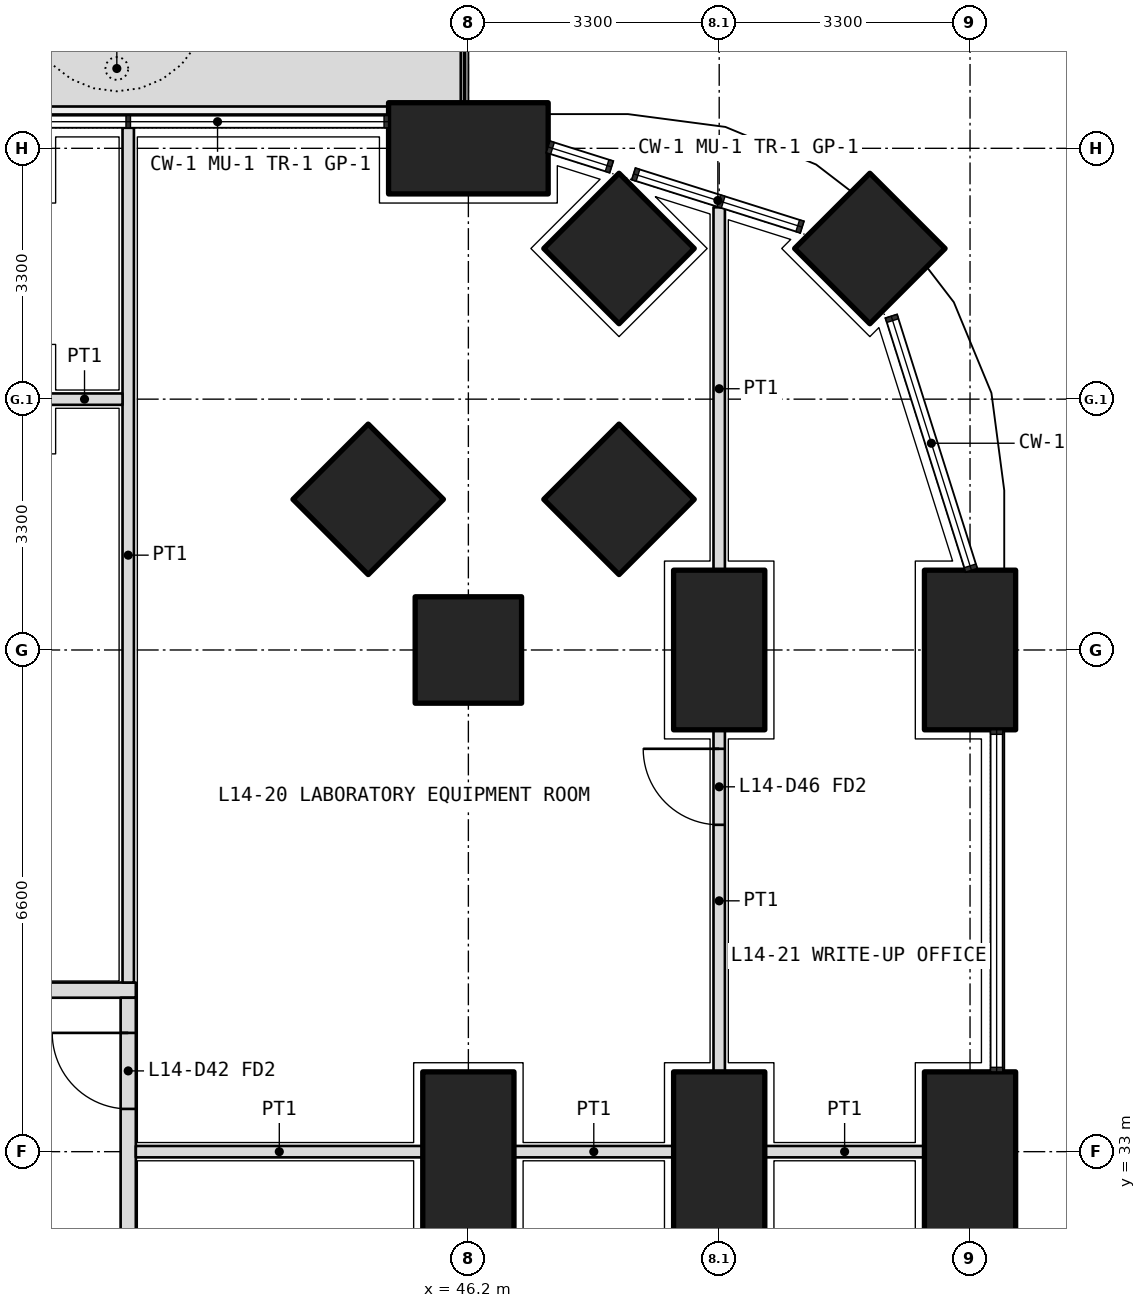
"""IFC4 building model, lengths in metres.
Left out: names, types, materials, properties, quantities, classifications, styles, units other than length and angle.
Written with IfcOpenShell. Run it as: python <this file> out.ifc"""

import sys

from ifc_helpers import new_model, si_unit, direction, frame, frame_2d, origin, origin_2d, place, context, subcontext, project, spatial, polyline, rectangle, outline, extrude, element, fill, save


model = new_model("IFC4")
c1 = context("Model", 3, precision=1e-05, world=origin(), true_north=direction((0.0, 1.0)))
c2 = subcontext(c1, "Body", "Model", "MODEL_VIEW")
j1 = project(units=[si_unit("LENGTHUNIT", "METRE"), si_unit("PLANEANGLEUNIT", "RADIAN")], contexts=[c1])
p1 = place(None, origin())
s1 = spatial("IfcSite", under=j1, at=p1, CompositionType="ELEMENT")
p2 = place(p1, origin())
s2 = spatial("IfcBuilding", under=s1, at=p2, CompositionType="ELEMENT")
p3 = place(p2, frame((0.0, 0.0, 63.3)))
s3 = spatial("IfcBuildingStorey", under=s2, at=p3, CompositionType="ELEMENT", Elevation=63.3)
p4 = place(p3, frame((51.482, 44.882, 0.0), z_axis=(0.0, 0.0, 1.0), x_axis=(0.707106781187, 0.707106781187, 0.0)))
e1 = element("IfcColumn", 1, at=p4, inside=s3, PredefinedType="COLUMN", context=c2, shape_type="SweptSolid", body=[
    extrude(rectangle(XDim=1.4, YDim=1.4, at=origin_2d()), origin(), (0.0, 0.0, 1.0), 4.2),
])
for number, where, z_axis, x_axis in (
    (2, (52.8, 33.0, 0.0), (0.0, 0.0, 1.0), (0.0, 1.0, 0.0)),
    (3, (52.8, 39.6, 0.0), (0.0, 0.0, 1.0), (0.0, 1.0, 0.0)),
    (4, (46.2, 46.2, 0.0), (0.0, 0.0, 1.0), (1.0, 0.0, 0.0)),
):
    element("IfcColumn", number, at=place(p3, frame(where, z_axis=z_axis, x_axis=x_axis)), inside=s3, PredefinedType="COLUMN", context=c2, shape_type="SweptSolid", body=[
        extrude(rectangle(XDim=2.1, YDim=1.2, at=origin_2d()), origin(), (0.0, 0.0, 1.0), 4.2),
    ])
for number, where, z_axis, x_axis in (
    (5, (46.2, 39.6, 0.0), (0.0, 0.0, 1.0), (1.0, 0.0, 0.0)),
    (6, (48.182, 44.882, 0.0), (0.0, 0.0, 1.0), (0.707, 0.707, 0.0)),
):
    element("IfcColumn", number, at=place(p3, frame(where, z_axis=z_axis, x_axis=x_axis)), inside=s3, PredefinedType="COLUMN", context=c2, shape_type="SweptSolid", body=[
        extrude(rectangle(XDim=1.4, YDim=1.4, at=origin_2d()), origin(), (0.0, 0.0, 1.0), 4.2),
    ])
for number, where, z_axis, x_axis in (
    (7, (49.5, 33.0, 0.0), (0.0, 0.0, 1.0), (0.0, 1.0, 0.0)),
    (8, (49.5, 39.6, 0.0), (0.0, 0.0, 1.0), (0.0, 1.0, 0.0)),
):
    element("IfcColumn", number, at=place(p3, frame(where, z_axis=z_axis, x_axis=x_axis)), inside=s3, PredefinedType="COLUMN", context=c2, shape_type="SweptSolid", body=[
        extrude(rectangle(XDim=2.1, YDim=1.2, at=origin_2d()), origin(), (0.0, 0.0, 1.0), 4.2),
    ])
for number, where, z_axis, x_axis in (
    (9, (48.182, 41.582, 0.0), (0.0, 0.0, 1.0), (0.707, 0.707, 0.0)),
    (10, (44.882, 41.582, 0.0), (0.0, 0.0, 1.0), (0.707, 0.707, 0.0)),
):
    element("IfcColumn", number, at=place(p3, frame(where, z_axis=z_axis, x_axis=x_axis)), inside=s3, PredefinedType="COLUMN", context=c2, shape_type="SweptSolid", body=[
        extrude(rectangle(XDim=1.4, YDim=1.4, at=origin_2d()), origin(), (0.0, 0.0, 1.0), 4.2),
    ])
p5 = place(p3, frame((46.2, 33.0, 0.0), z_axis=(0.0, 0.0, 1.0), x_axis=(0.0, 1.0, 0.0)))
e11 = element("IfcColumn", 11, at=p5, inside=s3, PredefinedType="COLUMN", context=c2, shape_type="SweptSolid", body=[
    extrude(rectangle(XDim=2.1, YDim=1.2, at=origin_2d()), origin(), (0.0, 0.0, 1.0), 4.2),
])
p6 = place(p3, origin())
e12 = element("IfcWall", 12, at=p6, inside=s3, PredefinedType="USERDEFINED", context=c2, shape_type="SweptSolid", body=[
    extrude(outline(polyline([(37.05, 46.75), (46.1, 46.75), (46.1, 47.75), (37.05, 47.75), (37.05, 46.75)]), holes=[polyline([(37.2, 46.9), (45.95, 46.9), (45.95, 47.6), (37.2, 47.6), (37.2, 46.9)])]), origin(), (0.0, 0.0, 1.0), 1.05),
])
p7 = place(p3, frame((10.975, 35.125, 0.0), z_axis=(0.0, 0.0, 1.0), x_axis=(1.0, 0.0, 0.0)))
e13 = element("IfcWall", 13, at=p7, inside=s3, PredefinedType="PARTITIONING", context=c2, shape_type="SweptSolid", body=[
    extrude(rectangle(XDim=30.85, YDim=0.2, at=frame_2d((15.425, 0.0))), origin(), (0.0, 0.0, 1.0), 2.85),
])
p8 = place(p7, frame((2.312, 0.0, 0.0)))
e14 = element("IfcOpeningElement", 14, at=p8, cuts=e13, PredefinedType="OPENING", context=c2, shape_type="SweptSolid", body=[
    extrude(rectangle(XDim=1.0, YDim=2.1, at=frame_2d((0.5, 1.05))), frame((0.0, 0.11, 0.0), z_axis=(0.0, -1.0, 0.0), x_axis=(1.0, 0.0, 0.0)), (0.0, 0.0, 1.0), 0.22),
])
p9 = place(p7, frame((13.175, 0.0, 0.0)))
e15 = element("IfcOpeningElement", 15, at=p9, cuts=e13, PredefinedType="OPENING", context=c2, shape_type="SweptSolid", body=[
    extrude(rectangle(XDim=1.2, YDim=2.1, at=frame_2d((0.6, 1.05))), frame((0.0, 0.11, 0.0), z_axis=(0.0, -1.0, 0.0), x_axis=(1.0, 0.0, 0.0)), (0.0, 0.0, 1.0), 0.22),
])
p10 = place(p7, frame((25.788, 0.0, 0.0)))
e16 = element("IfcOpeningElement", 16, at=p10, cuts=e13, PredefinedType="OPENING", context=c2, shape_type="SweptSolid", body=[
    extrude(rectangle(XDim=1.2, YDim=2.1, at=frame_2d((0.6, 1.05))), frame((0.0, 0.11, 0.0), z_axis=(0.0, -1.0, 0.0), x_axis=(1.0, 0.0, 0.0)), (0.0, 0.0, 1.0), 0.22),
])
p11 = place(p3, frame((41.725, 19.8, 0.0), z_axis=(0.0, 0.0, 1.0), x_axis=(0.0, 1.0, 0.0)))
e17 = element("IfcWall", 17, at=p11, inside=s3, PredefinedType="PARTITIONING", context=c2, shape_type="SweptSolid", body=[
    extrude(rectangle(XDim=15.225, YDim=0.2, at=frame_2d((7.612, 0.0))), origin(), (0.0, 0.0, 1.0), 2.85),
])
p12 = place(p11, frame((1.0, 0.0, 0.0)))
e18 = element("IfcOpeningElement", 18, at=p12, cuts=e17, PredefinedType="OPENING", context=c2, shape_type="SweptSolid", body=[
    extrude(rectangle(XDim=1.0, YDim=2.1, at=frame_2d((0.5, 1.05))), frame((0.0, 0.11, 0.0), z_axis=(0.0, -1.0, 0.0), x_axis=(1.0, 0.0, 0.0)), (0.0, 0.0, 1.0), 0.22),
])
p13 = place(p11, frame((4.35, 0.0, 0.0)))
e19 = element("IfcOpeningElement", 19, at=p13, cuts=e17, PredefinedType="OPENING", context=c2, shape_type="SweptSolid", body=[
    extrude(rectangle(XDim=0.9, YDim=2.1, at=frame_2d((0.45, 1.05))), frame((0.0, 0.11, 0.0), z_axis=(0.0, -1.0, 0.0), x_axis=(1.0, 0.0, 0.0)), (0.0, 0.0, 1.0), 0.22),
])
p14 = place(p11, frame((9.3, 0.0, 0.0)))
e20 = element("IfcOpeningElement", 20, at=p14, cuts=e17, PredefinedType="OPENING", context=c2, shape_type="SweptSolid", body=[
    extrude(rectangle(XDim=1.2, YDim=2.1, at=frame_2d((0.6, 1.05))), frame((0.0, 0.11, 0.0), z_axis=(0.0, -1.0, 0.0), x_axis=(1.0, 0.0, 0.0)), (0.0, 0.0, 1.0), 0.22),
])
p15 = place(p11, frame((13.762, 0.0, 0.0)))
e21 = element("IfcOpeningElement", 21, at=p15, cuts=e17, PredefinedType="OPENING", context=c2, shape_type="SweptSolid", body=[
    extrude(rectangle(XDim=1.0, YDim=2.1, at=frame_2d((0.5, 1.05))), frame((0.0, 0.11, 0.0), z_axis=(0.0, -1.0, 0.0), x_axis=(1.0, 0.0, 0.0)), (0.0, 0.0, 1.0), 0.22),
])
p16 = place(p3, frame((41.725, 46.47, 0.0), z_axis=(0.0, 0.0, 1.0), x_axis=(0.0, -1.0, 0.0)))
e22 = element("IfcWall", 22, at=p16, inside=s3, PredefinedType="PARTITIONING", context=c2, shape_type="SweptSolid", body=[
    extrude(rectangle(XDim=11.245, YDim=0.15, at=frame_2d((5.623, 0.0))), origin(), (0.0, 0.0, 1.0), 2.6),
])
p17 = place(p3, frame((49.5, 34.05, 0.0), z_axis=(0.0, 0.0, 1.0), x_axis=(0.0, 1.0, 0.0)))
e23 = element("IfcWall", 23, at=p17, inside=s3, PredefinedType="PARTITIONING", context=c2, shape_type="SweptSolid", body=[
    extrude(rectangle(XDim=4.5, YDim=0.15, at=frame_2d((2.25, 0.0))), origin(), (0.0, 0.0, 1.0), 3.9),
])
p18 = place(p17, frame((3.25, 0.0, 0.0)))
e24 = element("IfcOpeningElement", 24, at=p18, cuts=e23, PredefinedType="OPENING", context=c2, shape_type="SweptSolid", body=[
    extrude(rectangle(XDim=1.0, YDim=2.1, at=frame_2d((0.5, 1.05))), frame((0.0, 0.085, 0.0), z_axis=(0.0, -1.0, 0.0), x_axis=(1.0, 0.0, 0.0)), (0.0, 0.0, 1.0), 0.17),
])
p19 = place(p3, frame((49.5, 40.65, 0.0), z_axis=(0.0, 0.0, 1.0), x_axis=(0.0, 1.0, 0.0)))
e25 = element("IfcWall", 25, at=p19, inside=s3, PredefinedType="PARTITIONING", context=c2, shape_type="SweptSolid", body=[
    extrude(rectangle(XDim=4.774, YDim=0.15, at=frame_2d((2.387, 0.0))), origin(), (0.0, 0.0, 1.0), 2.6),
])
for number, where, z_axis, x_axis in (
    (26, (52.2, 33.0, 0.0), (0.0, 0.0, 1.0), (-1.0, 0.0, 0.0)),
    (27, (48.9, 33.0, 0.0), (0.0, 0.0, 1.0), (-1.0, 0.0, 0.0)),
):
    element("IfcWall", number, at=place(p3, frame(where, z_axis=z_axis, x_axis=x_axis)), inside=s3, PredefinedType="PARTITIONING", context=c2, shape_type="SweptSolid", body=[
        extrude(rectangle(XDim=2.1, YDim=0.15, at=frame_2d((1.05, 0.0))), origin(), (0.0, 0.0, 1.0), 2.85),
    ])
p20 = place(p3, frame((45.6, 33.0, 0.0), z_axis=(0.0, 0.0, 1.0), x_axis=(-1.0, 0.0, 0.0)))
e28 = element("IfcWall", 28, at=p20, inside=s3, PredefinedType="PARTITIONING", context=c2, shape_type="SweptSolid", body=[
    extrude(rectangle(XDim=3.775, YDim=0.15, at=frame_2d((1.888, 0.0))), origin(), (0.0, 0.0, 1.0), 2.85),
])
p21 = place(p3, frame((41.65, 42.9, 0.0), z_axis=(0.0, 0.0, 1.0), x_axis=(-1.0, 0.0, 0.0)))
e29 = element("IfcWall", 29, at=p21, inside=s3, PredefinedType="PARTITIONING", context=c2, shape_type="SweptSolid", body=[
    extrude(rectangle(XDim=1.0, YDim=0.15, at=frame_2d((0.5, 0.0))), origin(), (0.0, 0.0, 1.0), 3.9),
])
p22 = place(p15, origin())
e30 = element("IfcDoor", 30, at=p22, inside=s3, OperationType="SINGLE_SWING_RIGHT", PredefinedType="DOOR", context=c2, shape_type="SweptSolid", body=[
    extrude(rectangle(XDim=1.0, YDim=2.1, at=frame_2d((0.5, 1.05))), frame((0.0, 0.025, 0.0), z_axis=(0.0, -1.0, 0.0), x_axis=(1.0, 0.0, 0.0)), (0.0, 0.0, 1.0), 0.05),
])
fill(e21, e30)
p23 = place(p18, origin())
e31 = element("IfcDoor", 31, at=p23, inside=s3, OperationType="SINGLE_SWING_RIGHT", PredefinedType="DOOR", context=c2, shape_type="SweptSolid", body=[
    extrude(rectangle(XDim=1.0, YDim=2.1, at=frame_2d((0.5, 1.05))), frame((0.0, 0.025, 0.0), z_axis=(0.0, -1.0, 0.0), x_axis=(1.0, 0.0, 0.0)), (0.0, 0.0, 1.0), 0.05),
])
fill(e24, e31)
save(model, sys.argv[1])
